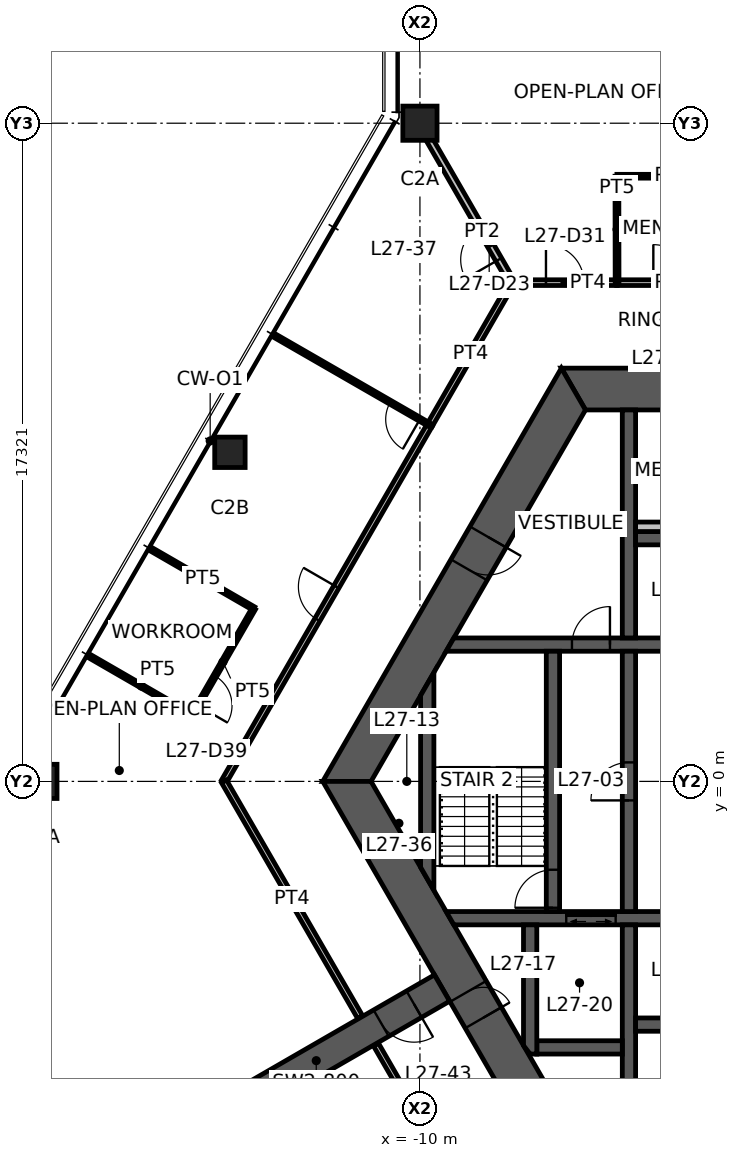
"""IFC4 building model, lengths in metres.
Left out: names, types, materials, properties, quantities, classifications, styles, units other than length and angle.
Written with IfcOpenShell. Run it as: python <this file> out.ifc"""

import sys

from ifc_helpers import new_model, si_unit, direction, frame, frame_2d, origin, origin_2d, place, context, subcontext, project, spatial, polyline, rectangle, hollow_rectangle, outline, extrude, element, fill, save


model = new_model("IFC4")
c1 = context("Model", 3, precision=1e-05, world=origin(), true_north=direction((0.0, 1.0)))
c2 = subcontext(c1, "Body", "Model", "MODEL_VIEW")
j1 = project(units=[si_unit("LENGTHUNIT", "METRE"), si_unit("PLANEANGLEUNIT", "RADIAN")], contexts=[c1])
p1 = place(None, origin())
s1 = spatial("IfcSite", under=j1, at=p1, CompositionType="ELEMENT")
p2 = place(p1, origin())
s2 = spatial("IfcBuilding", under=s1, at=p2, CompositionType="ELEMENT")
p3 = place(p2, frame((0.0, 0.0, 108.0)))
s3 = spatial("IfcBuildingStorey", under=s2, at=p3, CompositionType="ELEMENT", Elevation=108.0)
for number, where, z_axis, x_axis in (
    (1, (-10.0, 17.321, 0.0), (0.0, 0.0, 1.0), (1.0, 0.0, 0.0)),
    (2, (-20.0, 0.0, 0.0), (0.0, 0.0, 1.0), (1.0, 0.0, 0.0)),
):
    element("IfcColumn", number, at=place(p3, frame(where, z_axis=z_axis, x_axis=x_axis)), inside=s3, PredefinedType="COLUMN", context=c2, shape_type="SweptSolid", body=[
        extrude(hollow_rectangle(XDim=0.9, YDim=0.9, WallThickness=0.055, at=origin_2d()), origin(), (0.0, 0.0, 1.0), 3.9),
    ])
p4 = place(p3, frame((-15.0, 8.66, 0.0), z_axis=(0.0, 0.0, 1.0), x_axis=(1.0, 0.0, 0.0)))
e3 = element("IfcColumn", 3, at=p4, inside=s3, PredefinedType="COLUMN", context=c2, shape_type="SweptSolid", body=[
    extrude(hollow_rectangle(XDim=0.8, YDim=0.8, WallThickness=0.045, at=origin_2d()), origin(), (0.0, 0.0, 1.0), 3.9),
])
p5 = place(p3, frame((5.961, 10.325, 0.0), z_axis=(0.0, 0.0, 1.0), x_axis=(-1.0, 0.0, 0.0)))
e4 = element("IfcWall", 4, at=p5, inside=s3, PredefinedType="SHEAR", context=c2, shape_type="SweptSolid", body=[
    extrude(outline(polyline([(-0.318, -0.55), (4.599, -0.55), (5.499, -0.55), (6.424, -0.55), (7.323, -0.55), (12.24, -0.55), (11.605, 0.55), (7.323, 0.55), (6.424, 0.55), (5.499, 0.55), (4.599, 0.55), (0.318, 0.55), (-0.318, -0.55)])), origin(), (0.0, 0.0, 1.0), 3.9),
])
p6 = place(p5, frame((6.424, 0.0, 0.0)))
e5 = element("IfcOpeningElement", 5, at=p6, cuts=e4, PredefinedType="OPENING", context=c2, shape_type="SweptSolid", body=[
    extrude(rectangle(XDim=0.9, YDim=2.1, at=frame_2d((0.45, 1.05))), frame((0.0, 0.56, 0.0), z_axis=(0.0, -1.0, 0.0), x_axis=(1.0, 0.0, 0.0)), (0.0, 0.0, 1.0), 1.12),
])
p7 = place(p5, frame((4.599, 0.0, 0.0)))
e6 = element("IfcOpeningElement", 6, at=p7, cuts=e4, PredefinedType="OPENING", context=c2, shape_type="SweptSolid", body=[
    extrude(rectangle(XDim=0.9, YDim=2.1, at=frame_2d((0.45, 1.05))), frame((0.0, 0.56, 0.0), z_axis=(0.0, -1.0, 0.0), x_axis=(1.0, 0.0, 0.0)), (0.0, 0.0, 1.0), 1.12),
])
p8 = place(p3, frame((-5.961, 10.325, 0.0), z_axis=(0.0, 0.0, 1.0), x_axis=(-0.500004296715, -0.866022923061, 0.0)))
e7 = element("IfcWall", 7, at=p8, inside=s3, PredefinedType="SHEAR", context=c2, shape_type="SweptSolid", body=[
    extrude(outline(polyline([(-0.318, -0.55), (4.494, -0.55), (5.494, -0.55), (12.24, -0.55), (11.605, 0.55), (5.494, 0.55), (4.494, 0.55), (0.318, 0.55), (-0.318, -0.55)])), origin(), (0.0, 0.0, 1.0), 3.9),
])
p9 = place(p8, frame((4.494, 0.0, 0.0)))
e8 = element("IfcOpeningElement", 8, at=p9, cuts=e7, PredefinedType="OPENING", context=c2, shape_type="SweptSolid", body=[
    extrude(rectangle(XDim=1.0, YDim=2.1, at=frame_2d((0.5, 1.05))), frame((0.0, 0.56, 0.0), z_axis=(0.0, -1.0, 0.0), x_axis=(1.0, 0.0, 0.0)), (0.0, 0.0, 1.0), 1.12),
])
p10 = place(p3, frame((-11.922, 0.0, 0.0), z_axis=(0.0, 0.0, 1.0), x_axis=(0.500004296715, -0.866022923061, 0.0)))
e9 = element("IfcWall", 9, at=p10, inside=s3, PredefinedType="SHEAR", context=c2, shape_type="SweptSolid", body=[
    extrude(outline(polyline([(-0.318, -0.55), (6.381, -0.55), (7.181, -0.55), (12.24, -0.55), (11.605, 0.55), (7.181, 0.55), (6.381, 0.55), (0.318, 0.55), (-0.318, -0.55)])), origin(), (0.0, 0.0, 1.0), 3.9),
])
p11 = place(p10, frame((6.381, 0.0, 0.0)))
e10 = element("IfcOpeningElement", 10, at=p11, cuts=e9, PredefinedType="OPENING", context=c2, shape_type="SweptSolid", body=[
    extrude(rectangle(XDim=0.8, YDim=2.1, at=frame_2d((0.4, 1.05))), frame((0.0, 0.56, 0.0), z_axis=(0.0, -1.0, 0.0), x_axis=(1.0, 0.0, 0.0)), (0.0, 0.0, 1.0), 1.12),
])
p12 = place(p3, frame((-9.418, -5.438, 0.0), z_axis=(0.0, 0.0, 1.0), x_axis=(-0.866029782078, -0.499992416496, 0.0)))
e11 = element("IfcWall", 11, at=p12, inside=s3, PredefinedType="SHEAR", context=c2, shape_type="SweptSolid", body=[
    extrude(rectangle(XDim=7.646, YDim=0.8, at=frame_2d((3.823, 0.0))), origin(), (0.0, 0.0, 1.0), 3.9),
])
p13 = place(p12, frame((0.85, 0.0, 0.0)))
e12 = element("IfcOpeningElement", 12, at=p13, cuts=e11, PredefinedType="OPENING", context=c2, shape_type="SweptSolid", body=[
    extrude(rectangle(XDim=1.0, YDim=2.1, at=frame_2d((0.5, 1.05))), frame((0.0, 0.41, 0.0), z_axis=(0.0, -1.0, 0.0), x_axis=(1.0, 0.0, 0.0)), (0.0, 0.0, 1.0), 0.82),
])
p14 = place(p3, frame((-9.209, 3.6, 0.0), z_axis=(0.0, 0.0, 1.0), x_axis=(1.0, 0.0, 0.0)))
e13 = element("IfcWall", 13, at=p14, inside=s3, PredefinedType="SHEAR", context=c2, shape_type="SweptSolid", body=[
    extrude(outline(polyline([(-0.101, -0.175), (3.209, -0.175), (4.209, -0.175), (5.609, -0.175), (6.709, -0.175), (7.784, -0.175), (7.784, 0.175), (6.709, 0.175), (5.609, 0.175), (4.209, 0.175), (3.209, 0.175), (0.101, 0.175), (-0.101, -0.175)])), origin(), (0.0, 0.0, 1.0), 3.9),
])
p15 = place(p14, frame((3.209, 0.0, 0.0)))
e14 = element("IfcOpeningElement", 14, at=p15, cuts=e13, PredefinedType="OPENING", context=c2, shape_type="SweptSolid", body=[
    extrude(rectangle(XDim=1.0, YDim=2.1, at=frame_2d((0.5, 1.05))), frame((0.0, 0.185, 0.0), z_axis=(0.0, -1.0, 0.0), x_axis=(1.0, 0.0, 0.0)), (0.0, 0.0, 1.0), 0.37),
])
p16 = place(p14, frame((5.609, 0.0, 0.0)))
e15 = element("IfcOpeningElement", 15, at=p16, cuts=e13, PredefinedType="OPENING", context=c2, shape_type="SweptSolid", body=[
    extrude(rectangle(XDim=1.1, YDim=2.1, at=frame_2d((0.55, 1.05))), frame((0.0, 0.185, 0.0), z_axis=(0.0, -1.0, 0.0), x_axis=(1.0, 0.0, 0.0)), (0.0, 0.0, 1.0), 0.37),
])
p17 = place(p3, frame((-9.209, -3.6, 0.0), z_axis=(0.0, 0.0, 1.0), x_axis=(1.0, 0.0, 0.0)))
e16 = element("IfcWall", 16, at=p17, inside=s3, PredefinedType="SHEAR", context=c2, shape_type="SweptSolid", body=[
    extrude(outline(polyline([(0.101, -0.175), (3.059, -0.175), (4.359, -0.175), (5.609, -0.175), (6.709, -0.175), (7.784, -0.175), (7.784, 0.175), (6.709, 0.175), (5.609, 0.175), (4.359, 0.175), (3.059, 0.175), (-0.101, 0.175), (0.101, -0.175)])), origin(), (0.0, 0.0, 1.0), 3.9),
])
p18 = place(p17, frame((5.609, 0.0, 0.0)))
e17 = element("IfcOpeningElement", 17, at=p18, cuts=e16, PredefinedType="OPENING", context=c2, shape_type="SweptSolid", body=[
    extrude(rectangle(XDim=1.1, YDim=2.1, at=frame_2d((0.55, 1.05))), frame((0.0, 0.185, 0.0), z_axis=(0.0, -1.0, 0.0), x_axis=(1.0, 0.0, 0.0)), (0.0, 0.0, 1.0), 0.37),
])
p19 = place(p17, frame((3.059, 0.0, 0.0)))
e18 = element("IfcOpeningElement", 18, at=p19, cuts=e16, PredefinedType="OPENING", context=c2, shape_type="SweptSolid", body=[
    extrude(rectangle(XDim=1.3, YDim=2.1, at=frame_2d((0.65, 1.05))), frame((0.0, 0.185, 0.0), z_axis=(0.0, -1.0, 0.0), x_axis=(1.0, 0.0, 0.0)), (0.0, 0.0, 1.0), 0.37),
])
p20 = place(p3, frame((-4.5, -3.425, 0.0), z_axis=(0.0, 0.0, 1.0), x_axis=(0.0, 1.0, 0.0)))
e19 = element("IfcWall", 19, at=p20, inside=s3, PredefinedType="SHEAR", context=c2, shape_type="SweptSolid", body=[
    extrude(rectangle(XDim=6.85, YDim=0.35, at=frame_2d((3.425, 0.0))), origin(), (0.0, 0.0, 1.0), 3.9),
])
p21 = place(p20, frame((2.925, 0.0, 0.0)))
e20 = element("IfcOpeningElement", 20, at=p21, cuts=e19, PredefinedType="OPENING", context=c2, shape_type="SweptSolid", body=[
    extrude(rectangle(XDim=1.0, YDim=2.1, at=frame_2d((0.5, 1.05))), frame((0.0, 0.185, 0.0), z_axis=(0.0, -1.0, 0.0), x_axis=(1.0, 0.0, 0.0)), (0.0, 0.0, 1.0), 0.37),
])
p22 = place(p3, frame((-6.5, -3.425, 0.0), z_axis=(0.0, 0.0, 1.0), x_axis=(0.0, 1.0, 0.0)))
e21 = element("IfcWall", 21, at=p22, inside=s3, PredefinedType="SHEAR", context=c2, shape_type="SweptSolid", body=[
    extrude(rectangle(XDim=6.85, YDim=0.35, at=frame_2d((3.425, 0.0))), origin(), (0.0, 0.0, 1.0), 3.9),
])
p23 = place(p22, frame((0.1, 0.0, 0.0)))
e22 = element("IfcOpeningElement", 22, at=p23, cuts=e21, PredefinedType="OPENING", context=c2, shape_type="SweptSolid", body=[
    extrude(rectangle(XDim=1.0, YDim=2.1, at=frame_2d((0.5, 1.05))), frame((0.0, 0.185, 0.0), z_axis=(0.0, -1.0, 0.0), x_axis=(1.0, 0.0, 0.0)), (0.0, 0.0, 1.0), 0.37),
])
for number, where, z_axis, x_axis in (
    (23, (-4.5, 3.775, 0.0), (0.0, 0.0, 1.0), (0.0, 1.0, 0.0)),
    (24, (-4.5, -3.775, 0.0), (0.0, 0.0, 1.0), (0.0, -1.0, 0.0)),
):
    element("IfcWall", number, at=place(p3, frame(where, z_axis=z_axis, x_axis=x_axis)), inside=s3, PredefinedType="SHEAR", context=c2, shape_type="SweptSolid", body=[
        extrude(rectangle(XDim=6.0, YDim=0.35, at=frame_2d((3.0, 0.0))), origin(), (0.0, 0.0, 1.0), 3.9),
    ])
for number, where, z_axis, x_axis in (
    (25, (-4.325, 6.4, 0.0), (0.0, 0.0, 1.0), (1.0, 0.0, 0.0)),
    (26, (-4.325, -6.4, 0.0), (0.0, 0.0, 1.0), (1.0, 0.0, 0.0)),
):
    element("IfcWall", number, at=place(p3, frame(where, z_axis=z_axis, x_axis=x_axis)), inside=s3, PredefinedType="SHEAR", context=c2, shape_type="SweptSolid", body=[
        extrude(rectangle(XDim=2.55, YDim=0.35, at=frame_2d((1.275, 0.0))), origin(), (0.0, 0.0, 1.0), 3.9),
    ])
p24 = place(p3, frame((-6.925, -7.0, 0.0), z_axis=(0.0, 0.0, 1.0), x_axis=(1.0, 0.0, 0.0)))
e27 = element("IfcWall", 27, at=p24, inside=s3, PredefinedType="SHEAR", context=c2, shape_type="SweptSolid", body=[
    extrude(rectangle(XDim=2.25, YDim=0.35, at=frame_2d((1.125, 0.0))), origin(), (0.0, 0.0, 1.0), 3.9),
])
p25 = place(p3, frame((-7.1, -3.775, 0.0), z_axis=(0.0, 0.0, 1.0), x_axis=(0.0, -1.0, 0.0)))
e28 = element("IfcWall", 28, at=p25, inside=s3, PredefinedType="SHEAR", context=c2, shape_type="SweptSolid", body=[
    extrude(outline(polyline([(0.0, -0.175), (3.175, -0.175), (3.4, 0.0), (3.4, 0.175), (0.0, 0.175), (0.0, -0.175)])), origin(), (0.0, 0.0, 1.0), 3.9),
])
p26 = place(p3, frame((-9.808, -2.562, 0.0), z_axis=(0.0, 0.0, 1.0), x_axis=(0.0, 1.0, 0.0)))
e29 = element("IfcWall", 29, at=p26, inside=s3, PredefinedType="SHEAR", context=c2, shape_type="SweptSolid", body=[
    extrude(outline(polyline([(-0.303, -0.175), (5.428, -0.175), (4.821, 0.175), (0.303, 0.175), (-0.303, -0.175)])), origin(), (0.0, 0.0, 1.0), 3.9),
])
p27 = place(p3, frame((-4.325, 6.7, 0.0), z_axis=(0.0, 0.0, 1.0), x_axis=(1.0, 0.0, 0.0)))
e30 = element("IfcWall", 30, at=p27, inside=s3, PredefinedType="PLUMBINGWALL", context=c2, shape_type="SweptSolid", body=[
    extrude(rectangle(XDim=2.55, YDim=0.25, at=frame_2d((1.275, 0.0))), origin(), (0.0, 0.0, 1.0), 3.9),
])
p28 = place(p3, frame((-7.578, 13.125, 0.0), z_axis=(0.0, 0.0, 1.0), x_axis=(-0.500008905493, 0.866020262135, 0.0)))
e31 = element("IfcWall", 31, at=p28, inside=s3, PredefinedType="PARTITIONING", context=c2, shape_type="SweptSolid", body=[
    extrude(rectangle(XDim=4.845, YDim=0.175, at=frame_2d((2.422, 0.0))), origin(), (0.0, 0.0, 1.0), 3.05),
])
p29 = place(p28, frame((0.7, 0.0, 0.0)))
e32 = element("IfcOpeningElement", 32, at=p29, cuts=e31, PredefinedType="OPENING", context=c2, shape_type="SweptSolid", body=[
    extrude(rectangle(XDim=1.0, YDim=2.1, at=frame_2d((0.5, 1.05))), frame((0.0, 0.098, 0.0), z_axis=(0.0, -1.0, 0.0), x_axis=(1.0, 0.0, 0.0)), (0.0, 0.0, 1.0), 0.195),
])
p30 = place(p3, frame((-4.822, 13.125, 0.0), z_axis=(0.0, 0.0, 1.0), x_axis=(1.0, 0.0, 0.0)))
e33 = element("IfcWall", 33, at=p30, inside=s3, PredefinedType="PARTITIONING", context=c2, shape_type="SweptSolid", body=[
    extrude(rectangle(XDim=2.927, YDim=0.15, at=frame_2d((1.463, 0.0))), origin(), (0.0, 0.0, 1.0), 2.95),
])
p31 = place(p30, frame((0.963, 0.0, 0.0)))
e34 = element("IfcOpeningElement", 34, at=p31, cuts=e33, PredefinedType="OPENING", context=c2, shape_type="SweptSolid", body=[
    extrude(rectangle(XDim=1.0, YDim=2.1, at=frame_2d((0.5, 1.05))), frame((0.0, 0.085, 0.0), z_axis=(0.0, -1.0, 0.0), x_axis=(1.0, 0.0, 0.0)), (0.0, 0.0, 1.0), 0.17),
])
p32 = place(p3, frame((-7.555, 13.125, 0.0), z_axis=(0.0, 0.0, 1.0), x_axis=(1.0, 0.0, 0.0)))
e35 = element("IfcWall", 35, at=p32, inside=s3, PredefinedType="PARTITIONING", context=c2, shape_type="SweptSolid", body=[
    extrude(rectangle(XDim=2.742, YDim=0.15, at=frame_2d((1.371, 0.0))), origin(), (0.0, 0.0, 1.0), 2.95),
])
p33 = place(p32, frame((0.871, 0.0, 0.0)))
e36 = element("IfcOpeningElement", 36, at=p33, cuts=e35, PredefinedType="OPENING", context=c2, shape_type="SweptSolid", body=[
    extrude(rectangle(XDim=1.0, YDim=2.1, at=frame_2d((0.5, 1.05))), frame((0.0, 0.085, 0.0), z_axis=(0.0, -1.0, 0.0), x_axis=(1.0, 0.0, 0.0)), (0.0, 0.0, 1.0), 0.17),
])
p34 = place(p3, frame((-4.817, 15.925, 0.0), z_axis=(0.0, 0.0, 1.0), x_axis=(1.0, 0.0, 0.0)))
e37 = element("IfcWall", 37, at=p34, inside=s3, PredefinedType="PARTITIONING", context=c2, shape_type="SweptSolid", body=[
    extrude(rectangle(XDim=2.917, YDim=0.1, at=frame_2d((1.458, 0.0))), origin(), (0.0, 0.0, 1.0), 2.95),
])
p35 = place(p3, frame((-4.812, 13.125, 0.0), z_axis=(0.0, 0.0, 1.0), x_axis=(-0.001569446145, 0.999998768419, 0.0)))
e38 = element("IfcWall", 38, at=p35, inside=s3, PredefinedType="PARTITIONING", context=c2, shape_type="SweptSolid", body=[
    extrude(rectangle(XDim=2.8, YDim=0.1, at=frame_2d((1.4, 0.0))), origin(), (0.0, 0.0, 1.0), 2.95),
])
p36 = place(p3, frame((-9.746, 9.37, 0.0), z_axis=(0.0, 0.0, 1.0), x_axis=(0.499980509014, 0.866036656618, 0.0)))
e39 = element("IfcWall", 39, at=p36, inside=s3, PredefinedType="PARTITIONING", context=c2, shape_type="SweptSolid", body=[
    extrude(rectangle(XDim=4.313, YDim=0.15, at=frame_2d((2.157, 0.0))), origin(), (0.0, 0.0, 1.0), 2.95),
])
p37 = place(p3, frame((-15.156, 0.0, 0.0), z_axis=(0.0, 0.0, 1.0), x_axis=(0.500006743721, 0.866021510261, 0.0)))
e40 = element("IfcWall", 40, at=p37, inside=s3, PredefinedType="PARTITIONING", context=c2, shape_type="SweptSolid", body=[
    extrude(rectangle(XDim=10.828, YDim=0.15, at=frame_2d((5.414, 0.0))), origin(), (0.0, 0.0, 1.0), 2.95),
])
p38 = place(p37, frame((4.914, 0.0, 0.0)))
e41 = element("IfcOpeningElement", 41, at=p38, cuts=e40, PredefinedType="OPENING", context=c2, shape_type="SweptSolid", body=[
    extrude(rectangle(XDim=1.0, YDim=2.1, at=frame_2d((0.5, 1.05))), frame((0.0, 0.085, 0.0), z_axis=(0.0, -1.0, 0.0), x_axis=(1.0, 0.0, 0.0)), (0.0, 0.0, 1.0), 0.17),
])
p39 = place(p3, frame((-11.577, -6.199, 0.0), z_axis=(0.0, 0.0, 1.0), x_axis=(-0.500001961223, 0.866024271469, 0.0)))
e42 = element("IfcWall", 42, at=p39, inside=s3, PredefinedType="PARTITIONING", context=c2, shape_type="SweptSolid", body=[
    extrude(rectangle(XDim=7.158, YDim=0.15, at=frame_2d((3.579, 0.0))), origin(), (0.0, 0.0, 1.0), 2.95),
])
p40 = place(p3, frame((-9.741, 9.378, 0.0), z_axis=(0.0, 0.0, 1.0), x_axis=(-0.866493666502, 0.499188066675, 0.0)))
e43 = element("IfcWall", 43, at=p40, inside=s3, PredefinedType="PARTITIONING", context=c2, shape_type="SweptSolid", body=[
    extrude(rectangle(XDim=4.72, YDim=0.1, at=frame_2d((2.36, 0.0))), origin(), (0.0, 0.0, 1.0), 2.95),
])
p41 = place(p40, frame((0.3, 0.0, 0.0)))
e44 = element("IfcOpeningElement", 44, at=p41, cuts=e43, PredefinedType="OPENING", context=c2, shape_type="SweptSolid", body=[
    extrude(rectangle(XDim=0.9, YDim=2.1, at=frame_2d((0.45, 1.05))), frame((0.0, 0.06, 0.0), z_axis=(0.0, -1.0, 0.0), x_axis=(1.0, 0.0, 0.0)), (0.0, 0.0, 1.0), 0.12),
])
p42 = place(p3, frame((-17.056, 6.099, 0.0), z_axis=(0.0, 0.0, 1.0), x_axis=(0.86600983753, -0.500026960575, 0.0)))
e45 = element("IfcWall", 45, at=p42, inside=s3, PredefinedType="PARTITIONING", context=c2, shape_type="SweptSolid", body=[
    extrude(rectangle(XDim=3.1, YDim=0.1, at=frame_2d((1.55, 0.0))), origin(), (0.0, 0.0, 1.0), 2.95),
])
p43 = place(p3, frame((-15.995, 1.737, 0.0), z_axis=(0.0, 0.0, 1.0), x_axis=(-0.866029832698, 0.499992328818, 0.0)))
e46 = element("IfcWall", 46, at=p43, inside=s3, PredefinedType="PARTITIONING", context=c2, shape_type="SweptSolid", body=[
    extrude(rectangle(XDim=3.08, YDim=0.1, at=frame_2d((1.54, 0.0))), origin(), (0.0, 0.0, 1.0), 2.95),
])
p44 = place(p3, frame((-14.372, 4.549, 0.0), z_axis=(0.0, 0.0, 1.0), x_axis=(-0.499956811548, -0.866050337213, 0.0)))
e47 = element("IfcWall", 47, at=p44, inside=s3, PredefinedType="PARTITIONING", context=c2, shape_type="SweptSolid", body=[
    extrude(rectangle(XDim=3.246, YDim=0.1, at=frame_2d((1.623, 0.0))), origin(), (0.0, 0.0, 1.0), 2.95),
])
p45 = place(p44, frame((2.046, 0.0, 0.0)))
e48 = element("IfcOpeningElement", 48, at=p45, cuts=e47, PredefinedType="OPENING", context=c2, shape_type="SweptSolid", body=[
    extrude(rectangle(XDim=0.9, YDim=2.1, at=frame_2d((0.45, 1.05))), frame((0.0, 0.06, 0.0), z_axis=(0.0, -1.0, 0.0), x_axis=(1.0, 0.0, 0.0)), (0.0, 0.0, 1.0), 0.12),
])
p46 = place(p3, frame((-10.564, -7.952, 0.0), z_axis=(0.0, 0.0, 1.0), x_axis=(-0.500085263423, 0.865976171327, 0.0)))
e49 = element("IfcWall", 49, at=p46, inside=s3, PredefinedType="PARTITIONING", context=c2, shape_type="SweptSolid", body=[
    extrude(rectangle(XDim=1.184, YDim=0.15, at=frame_2d((0.592, 0.0))), origin(), (0.0, 0.0, 1.0), 2.95),
])
p47 = place(p11, origin())
e50 = element("IfcDoor", 50, at=p47, inside=s3, OperationType="SINGLE_SWING_RIGHT", PredefinedType="DOOR", context=c2, shape_type="SweptSolid", body=[
    extrude(rectangle(XDim=0.8, YDim=2.1, at=frame_2d((0.4, 1.05))), frame((0.0, 0.025, 0.0), z_axis=(0.0, -1.0, 0.0), x_axis=(1.0, 0.0, 0.0)), (0.0, 0.0, 1.0), 0.05),
])
fill(e10, e50)
p48 = place(p9, origin())
e51 = element("IfcDoor", 51, at=p48, inside=s3, OperationType="SINGLE_SWING_LEFT", PredefinedType="DOOR", context=c2, shape_type="SweptSolid", body=[
    extrude(rectangle(XDim=1.0, YDim=2.1, at=frame_2d((0.5, 1.05))), frame((0.0, 0.025, 0.0), z_axis=(0.0, -1.0, 0.0), x_axis=(1.0, 0.0, 0.0)), (0.0, 0.0, 1.0), 0.05),
])
fill(e8, e51)
p49 = place(p21, origin())
e52 = element("IfcDoor", 52, at=p49, inside=s3, OperationType="SINGLE_SWING_LEFT", PredefinedType="DOOR", context=c2, shape_type="SweptSolid", body=[
    extrude(rectangle(XDim=1.0, YDim=2.1, at=frame_2d((0.5, 1.05))), frame((0.0, 0.025, 0.0), z_axis=(0.0, -1.0, 0.0), x_axis=(1.0, 0.0, 0.0)), (0.0, 0.0, 1.0), 0.05),
])
fill(e20, e52)
p50 = place(p23, origin())
e53 = element("IfcDoor", 53, at=p50, inside=s3, OperationType="SINGLE_SWING_LEFT", PredefinedType="DOOR", context=c2, shape_type="SweptSolid", body=[
    extrude(rectangle(XDim=1.0, YDim=2.1, at=frame_2d((0.5, 1.05))), frame((0.0, 0.025, 0.0), z_axis=(0.0, -1.0, 0.0), x_axis=(1.0, 0.0, 0.0)), (0.0, 0.0, 1.0), 0.05),
])
fill(e22, e53)
p51 = place(p15, origin())
e54 = element("IfcDoor", 54, at=p51, inside=s3, OperationType="SINGLE_SWING_RIGHT", PredefinedType="DOOR", context=c2, shape_type="SweptSolid", body=[
    extrude(rectangle(XDim=1.0, YDim=2.1, at=frame_2d((0.5, 1.05))), frame((0.0, 0.025, 0.0), z_axis=(0.0, -1.0, 0.0), x_axis=(1.0, 0.0, 0.0)), (0.0, 0.0, 1.0), 0.05),
])
fill(e14, e54)
p52 = place(p13, origin())
e55 = element("IfcDoor", 55, at=p52, inside=s3, OperationType="SINGLE_SWING_LEFT", PredefinedType="DOOR", context=c2, shape_type="SweptSolid", body=[
    extrude(rectangle(XDim=1.0, YDim=2.1, at=frame_2d((0.5, 1.05))), frame((0.0, 0.025, 0.0), z_axis=(0.0, -1.0, 0.0), x_axis=(1.0, 0.0, 0.0)), (0.0, 0.0, 1.0), 0.05),
])
fill(e12, e55)
p53 = place(p29, origin())
e56 = element("IfcDoor", 56, at=p53, inside=s3, OperationType="SINGLE_SWING_LEFT", PredefinedType="DOOR", context=c2, shape_type="SweptSolid", body=[
    extrude(rectangle(XDim=1.0, YDim=2.1, at=frame_2d((0.5, 1.05))), frame((0.0, 0.025, 0.0), z_axis=(0.0, -1.0, 0.0), x_axis=(1.0, 0.0, 0.0)), (0.0, 0.0, 1.0), 0.05),
])
fill(e32, e56)
p54 = place(p31, origin())
e57 = element("IfcDoor", 57, at=p54, inside=s3, OperationType="SINGLE_SWING_LEFT", PredefinedType="DOOR", context=c2, shape_type="SweptSolid", body=[
    extrude(rectangle(XDim=1.0, YDim=2.1, at=frame_2d((0.5, 1.05))), frame((0.0, 0.025, 0.0), z_axis=(0.0, -1.0, 0.0), x_axis=(1.0, 0.0, 0.0)), (0.0, 0.0, 1.0), 0.05),
])
fill(e34, e57)
p55 = place(p33, origin())
e58 = element("IfcDoor", 58, at=p55, inside=s3, OperationType="SINGLE_SWING_LEFT", PredefinedType="DOOR", context=c2, shape_type="SweptSolid", body=[
    extrude(rectangle(XDim=1.0, YDim=2.1, at=frame_2d((0.5, 1.05))), frame((0.0, 0.025, 0.0), z_axis=(0.0, -1.0, 0.0), x_axis=(1.0, 0.0, 0.0)), (0.0, 0.0, 1.0), 0.05),
])
fill(e36, e58)
p56 = place(p38, origin())
e59 = element("IfcDoor", 59, at=p56, inside=s3, OperationType="SINGLE_SWING_RIGHT", PredefinedType="DOOR", context=c2, shape_type="SweptSolid", body=[
    extrude(rectangle(XDim=1.0, YDim=2.1, at=frame_2d((0.5, 1.05))), frame((0.0, 0.025, 0.0), z_axis=(0.0, -1.0, 0.0), x_axis=(1.0, 0.0, 0.0)), (0.0, 0.0, 1.0), 0.05),
])
fill(e41, e59)
p57 = place(p41, origin())
e60 = element("IfcDoor", 60, at=p57, inside=s3, OperationType="SINGLE_SWING_LEFT", PredefinedType="DOOR", context=c2, shape_type="SweptSolid", body=[
    extrude(rectangle(XDim=0.9, YDim=2.1, at=frame_2d((0.45, 1.05))), frame((0.0, 0.025, 0.0), z_axis=(0.0, -1.0, 0.0), x_axis=(1.0, 0.0, 0.0)), (0.0, 0.0, 1.0), 0.05),
])
fill(e44, e60)
p58 = place(p45, origin())
e61 = element("IfcDoor", 61, at=p58, inside=s3, OperationType="SINGLE_SWING_RIGHT", PredefinedType="DOOR", context=c2, shape_type="SweptSolid", body=[
    extrude(rectangle(XDim=0.9, YDim=2.1, at=frame_2d((0.45, 1.05))), frame((0.0, 0.025, 0.0), z_axis=(0.0, -1.0, 0.0), x_axis=(1.0, 0.0, 0.0)), (0.0, 0.0, 1.0), 0.05),
])
fill(e48, e61)
p59 = place(p19, origin())
e62 = element("IfcDoor", 62, at=p59, inside=s3, OperationType="DOUBLE_DOOR_SLIDING", PredefinedType="DOOR", context=c2, shape_type="SweptSolid", body=[
    extrude(rectangle(XDim=1.3, YDim=2.1, at=frame_2d((0.65, 1.05))), frame((0.0, 0.025, 0.0), z_axis=(0.0, -1.0, 0.0), x_axis=(1.0, 0.0, 0.0)), (0.0, 0.0, 1.0), 0.05),
])
fill(e18, e62)
save(model, sys.argv[1])
